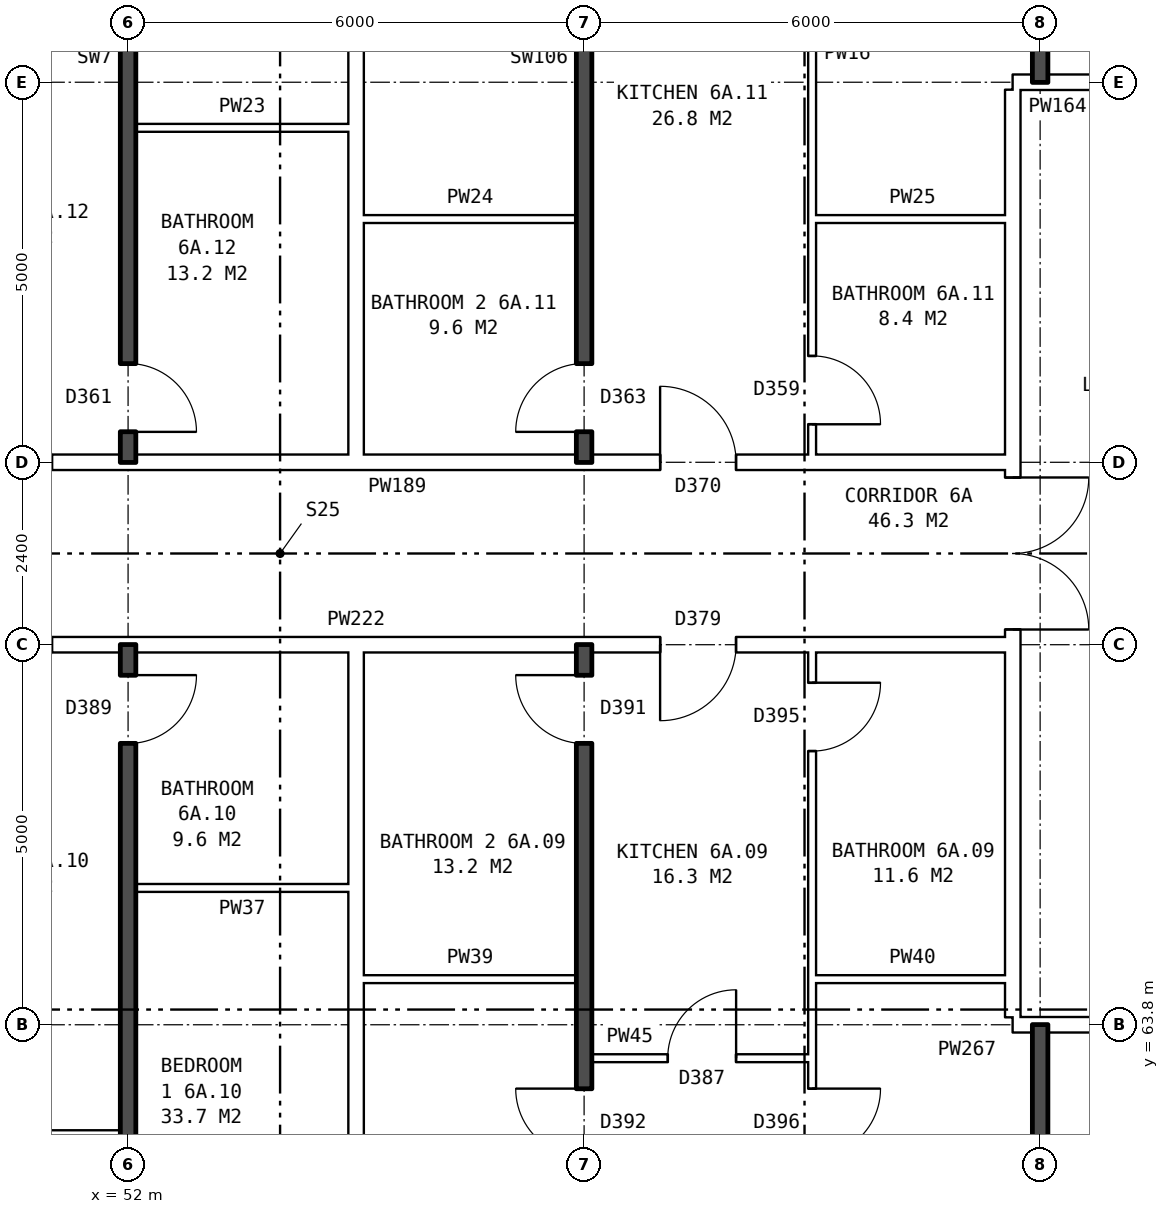
"""IFC4 building model, lengths in metres.
Left out: names, types, materials, properties, quantities, classifications, styles, units other than length and angle.
Written with IfcOpenShell. Run it as: python <this file> out.ifc"""

import sys

from ifc_helpers import new_model, si_unit, direction, frame, frame_2d, origin, place, context, subcontext, project, spatial, rectangle, extrude, element, fill, save


model = new_model("IFC4")
c1 = context("Model", 3, precision=1e-05, world=origin(), true_north=direction((0.0, 1.0)))
c2 = subcontext(c1, "Body", "Model", "MODEL_VIEW")
j1 = project(units=[si_unit("LENGTHUNIT", "METRE"), si_unit("PLANEANGLEUNIT", "RADIAN")], contexts=[c1])
p1 = place(None, origin())
s1 = spatial("IfcSite", under=j1, at=p1, CompositionType="ELEMENT")
p2 = place(p1, origin())
s2 = spatial("IfcBuilding", under=s1, at=p2, CompositionType="ELEMENT")
p3 = place(p2, frame((0.0, 0.0, 25.7)))
s3 = spatial("IfcBuildingStorey", under=s2, at=p3, CompositionType="ELEMENT", Elevation=25.7)
p4 = place(p3, frame((63.64, 63.9, 0.0), z_axis=(0.0, 0.0, 1.0), x_axis=(0.0, 1.0, 0.0)))
e1 = element("IfcWall", 1, at=p4, inside=s3, PredefinedType="PARTITIONING", context=c2, shape_type="SweptSolid", body=[
    extrude(rectangle(XDim=12.2, YDim=0.2, at=frame_2d((6.1, 0.0))), origin(), (0.0, 0.0, 1.0), 2.85),
])
p5 = place(p4, frame((5.1, 0.0, 0.0)))
e2 = element("IfcOpeningElement", 2, at=p5, cuts=e1, PredefinedType="OPENING", context=c2, shape_type="SweptSolid", body=[
    extrude(rectangle(XDim=2.0, YDim=2.1, at=frame_2d((1.0, 1.05))), frame((0.0, 0.11, 0.0), z_axis=(0.0, -1.0, 0.0), x_axis=(1.0, 0.0, 0.0)), (0.0, 0.0, 1.0), 0.22),
])
p6 = place(p3, frame((49.0, 62.36, 0.0), z_axis=(0.0, 0.0, 1.0), x_axis=(1.0, 0.0, 0.0)))
e3 = element("IfcWall", 3, at=p6, inside=s3, PredefinedType="PARTITIONING", context=c2, shape_type="SweptSolid", body=[
    extrude(rectangle(XDim=2.9, YDim=0.1, at=frame_2d((1.45, 0.0))), origin(), (0.0, 0.0, 1.0), 2.85),
])
p7 = place(p6, frame((1.0, 0.0, 0.0)))
e4 = element("IfcOpeningElement", 4, at=p7, cuts=e3, PredefinedType="OPENING", context=c2, shape_type="SweptSolid", body=[
    extrude(rectangle(XDim=0.9, YDim=2.1, at=frame_2d((0.45, 1.05))), frame((0.0, 0.06, 0.0), z_axis=(0.0, -1.0, 0.0), x_axis=(1.0, 0.0, 0.0)), (0.0, 0.0, 1.0), 0.12),
])
p8 = place(p3, frame((58.1, 63.36, 0.0), z_axis=(0.0, 0.0, 1.0), x_axis=(1.0, 0.0, 0.0)))
e5 = element("IfcWall", 5, at=p8, inside=s3, PredefinedType="PARTITIONING", context=c2, shape_type="SweptSolid", body=[
    extrude(rectangle(XDim=2.9, YDim=0.1, at=frame_2d((1.45, 0.0))), origin(), (0.0, 0.0, 1.0), 2.85),
])
p9 = place(p8, frame((1.0, 0.0, 0.0)))
e6 = element("IfcOpeningElement", 6, at=p9, cuts=e5, PredefinedType="OPENING", context=c2, shape_type="SweptSolid", body=[
    extrude(rectangle(XDim=0.9, YDim=2.1, at=frame_2d((0.45, 1.05))), frame((0.0, 0.06, 0.0), z_axis=(0.0, -1.0, 0.0), x_axis=(1.0, 0.0, 0.0)), (0.0, 0.0, 1.0), 0.12),
])
p10 = place(p3, frame((63.64, 63.8, 0.0), z_axis=(0.0, 0.0, 1.0), x_axis=(1.0, 0.0, 0.0)))
e7 = element("IfcWall", 7, at=p10, inside=s3, PredefinedType="PARTITIONING", context=c2, shape_type="SweptSolid", body=[
    extrude(rectangle(XDim=3.0, YDim=0.2, at=frame_2d((1.5, 0.0))), origin(), (0.0, 0.0, 1.0), 2.85),
])
p11 = place(p10, frame((1.18, 0.0, 0.0)))
e8 = element("IfcOpeningElement", 8, at=p11, cuts=e7, PredefinedType="OPENING", context=c2, shape_type="SweptSolid", body=[
    extrude(rectangle(XDim=1.0, YDim=2.1, at=frame_2d((0.5, 1.05))), frame((0.0, 0.11, 0.0), z_axis=(0.0, -1.0, 0.0), x_axis=(1.0, 0.0, 0.0)), (0.0, 0.0, 1.0), 0.22),
])
p12 = place(p3, frame((55.1, 64.4, 0.0), z_axis=(0.0, 0.0, 1.0), x_axis=(1.0, 0.0, 0.0)))
e9 = element("IfcWall", 9, at=p12, inside=s3, PredefinedType="PARTITIONING", context=c2, shape_type="SweptSolid", body=[
    extrude(rectangle(XDim=2.8, YDim=0.1, at=frame_2d((1.4, 0.0))), origin(), (0.0, 0.0, 1.0), 2.85),
])
p13 = place(p3, frame((61.0, 64.4, 0.0), z_axis=(0.0, 0.0, 1.0), x_axis=(1.0, 0.0, 0.0)))
e10 = element("IfcWall", 10, at=p13, inside=s3, PredefinedType="PARTITIONING", context=c2, shape_type="SweptSolid", body=[
    extrude(rectangle(XDim=2.64, YDim=0.1, at=frame_2d((1.32, 0.0))), origin(), (0.0, 0.0, 1.0), 2.85),
])
p14 = place(p3, frame((52.1, 65.6, 0.0), z_axis=(0.0, 0.0, 1.0), x_axis=(1.0, 0.0, 0.0)))
e11 = element("IfcWall", 11, at=p14, inside=s3, PredefinedType="PARTITIONING", context=c2, shape_type="SweptSolid", body=[
    extrude(rectangle(XDim=2.8, YDim=0.1, at=frame_2d((1.4, 0.0))), origin(), (0.0, 0.0, 1.0), 2.85),
])
p15 = place(p3, frame((44.36, 68.8, 0.0), z_axis=(0.0, 0.0, 1.0), x_axis=(1.0, 0.0, 0.0)))
e12 = element("IfcWall", 12, at=p15, inside=s3, PredefinedType="PARTITIONING", context=c2, shape_type="SweptSolid", body=[
    extrude(rectangle(XDim=19.28, YDim=0.2, at=frame_2d((9.64, 0.0))), origin(), (0.0, 0.0, 1.0), 2.85),
])
p16 = place(p15, frame((14.64, 0.0, 0.0)))
e13 = element("IfcOpeningElement", 13, at=p16, cuts=e12, PredefinedType="OPENING", context=c2, shape_type="SweptSolid", body=[
    extrude(rectangle(XDim=1.0, YDim=2.1, at=frame_2d((0.5, 1.05))), frame((0.0, 0.11, 0.0), z_axis=(0.0, -1.0, 0.0), x_axis=(1.0, 0.0, 0.0)), (0.0, 0.0, 1.0), 0.22),
])
p17 = place(p15, frame((5.64, 0.0, 0.0)))
e14 = element("IfcOpeningElement", 14, at=p17, cuts=e12, PredefinedType="OPENING", context=c2, shape_type="SweptSolid", body=[
    extrude(rectangle(XDim=1.0, YDim=2.1, at=frame_2d((0.5, 1.05))), frame((0.0, 0.11, 0.0), z_axis=(0.0, -1.0, 0.0), x_axis=(1.0, 0.0, 0.0)), (0.0, 0.0, 1.0), 0.22),
])
p18 = place(p3, frame((44.36, 71.2, 0.0), z_axis=(0.0, 0.0, 1.0), x_axis=(1.0, 0.0, 0.0)))
e15 = element("IfcWall", 15, at=p18, inside=s3, PredefinedType="PARTITIONING", context=c2, shape_type="SweptSolid", body=[
    extrude(rectangle(XDim=19.28, YDim=0.2, at=frame_2d((9.64, 0.0))), origin(), (0.0, 0.0, 1.0), 2.85),
])
p19 = place(p18, frame((14.64, 0.0, 0.0)))
e16 = element("IfcOpeningElement", 16, at=p19, cuts=e15, PredefinedType="OPENING", context=c2, shape_type="SweptSolid", body=[
    extrude(rectangle(XDim=1.0, YDim=2.1, at=frame_2d((0.5, 1.05))), frame((0.0, 0.11, 0.0), z_axis=(0.0, -1.0, 0.0), x_axis=(1.0, 0.0, 0.0)), (0.0, 0.0, 1.0), 0.22),
])
p20 = place(p18, frame((5.64, 0.0, 0.0)))
e17 = element("IfcOpeningElement", 17, at=p20, cuts=e15, PredefinedType="OPENING", context=c2, shape_type="SweptSolid", body=[
    extrude(rectangle(XDim=1.0, YDim=2.1, at=frame_2d((0.5, 1.05))), frame((0.0, 0.11, 0.0), z_axis=(0.0, -1.0, 0.0), x_axis=(1.0, 0.0, 0.0)), (0.0, 0.0, 1.0), 0.22),
])
p21 = place(p3, frame((55.1, 74.4, 0.0), z_axis=(0.0, 0.0, 1.0), x_axis=(1.0, 0.0, 0.0)))
e18 = element("IfcWall", 18, at=p21, inside=s3, PredefinedType="PARTITIONING", context=c2, shape_type="SweptSolid", body=[
    extrude(rectangle(XDim=2.8, YDim=0.1, at=frame_2d((1.4, 0.0))), origin(), (0.0, 0.0, 1.0), 2.85),
])
p22 = place(p3, frame((61.0, 74.4, 0.0), z_axis=(0.0, 0.0, 1.0), x_axis=(1.0, 0.0, 0.0)))
e19 = element("IfcWall", 19, at=p22, inside=s3, PredefinedType="PARTITIONING", context=c2, shape_type="SweptSolid", body=[
    extrude(rectangle(XDim=2.64, YDim=0.1, at=frame_2d((1.32, 0.0))), origin(), (0.0, 0.0, 1.0), 2.85),
])
p23 = place(p3, frame((52.1, 75.6, 0.0), z_axis=(0.0, 0.0, 1.0), x_axis=(1.0, 0.0, 0.0)))
e20 = element("IfcWall", 20, at=p23, inside=s3, PredefinedType="PARTITIONING", context=c2, shape_type="SweptSolid", body=[
    extrude(rectangle(XDim=2.8, YDim=0.1, at=frame_2d((1.4, 0.0))), origin(), (0.0, 0.0, 1.0), 2.85),
])
p24 = place(p3, frame((63.64, 76.2, 0.0), z_axis=(0.0, 0.0, 1.0), x_axis=(1.0, 0.0, 0.0)))
e21 = element("IfcWall", 21, at=p24, inside=s3, PredefinedType="PARTITIONING", context=c2, shape_type="SweptSolid", body=[
    extrude(rectangle(XDim=3.0, YDim=0.2, at=frame_2d((1.5, 0.0))), origin(), (0.0, 0.0, 1.0), 2.85),
])
p25 = place(p24, frame((1.18, 0.0, 0.0)))
e22 = element("IfcOpeningElement", 22, at=p25, cuts=e21, PredefinedType="OPENING", context=c2, shape_type="SweptSolid", body=[
    extrude(rectangle(XDim=1.0, YDim=2.1, at=frame_2d((0.5, 1.05))), frame((0.0, 0.11, 0.0), z_axis=(0.0, -1.0, 0.0), x_axis=(1.0, 0.0, 0.0)), (0.0, 0.0, 1.0), 0.22),
])
p26 = place(p3, frame((52.0, 54.36, 0.0), z_axis=(0.0, 0.0, 1.0), x_axis=(0.0, 1.0, 0.0)))
e23 = element("IfcWall", 23, at=p26, inside=s3, PredefinedType="SOLIDWALL", context=c2, shape_type="SweptSolid", body=[
    extrude(rectangle(XDim=14.44, YDim=0.2, at=frame_2d((7.22, 0.0))), origin(), (0.0, 0.0, 1.0), 2.85),
])
p27 = place(p26, frame((6.7, 0.0, 0.0)))
e24 = element("IfcOpeningElement", 24, at=p27, cuts=e23, PredefinedType="OPENING", context=c2, shape_type="SweptSolid", body=[
    extrude(rectangle(XDim=0.9, YDim=2.1, at=frame_2d((0.45, 1.05))), frame((0.0, 0.11, 0.0), z_axis=(0.0, -1.0, 0.0), x_axis=(1.0, 0.0, 0.0)), (0.0, 0.0, 1.0), 0.22),
])
p28 = place(p26, frame((13.14, 0.0, 0.0)))
e25 = element("IfcOpeningElement", 25, at=p28, cuts=e23, PredefinedType="OPENING", context=c2, shape_type="SweptSolid", body=[
    extrude(rectangle(XDim=0.9, YDim=2.1, at=frame_2d((0.45, 1.05))), frame((0.0, 0.11, 0.0), z_axis=(0.0, -1.0, 0.0), x_axis=(1.0, 0.0, 0.0)), (0.0, 0.0, 1.0), 0.22),
])
p29 = place(p3, frame((52.0, 71.2, 0.0), z_axis=(0.0, 0.0, 1.0), x_axis=(0.0, 1.0, 0.0)))
e26 = element("IfcWall", 26, at=p29, inside=s3, PredefinedType="SOLIDWALL", context=c2, shape_type="SweptSolid", body=[
    extrude(rectangle(XDim=14.44, YDim=0.2, at=frame_2d((7.22, 0.0))), origin(), (0.0, 0.0, 1.0), 2.85),
])
p30 = place(p29, frame((9.34, 0.0, 0.0)))
e27 = element("IfcOpeningElement", 27, at=p30, cuts=e26, PredefinedType="OPENING", context=c2, shape_type="SweptSolid", body=[
    extrude(rectangle(XDim=0.9, YDim=2.1, at=frame_2d((0.45, 1.05))), frame((0.0, 0.11, 0.0), z_axis=(0.0, -1.0, 0.0), x_axis=(1.0, 0.0, 0.0)), (0.0, 0.0, 1.0), 0.22),
])
p31 = place(p29, frame((0.4, 0.0, 0.0)))
e28 = element("IfcOpeningElement", 28, at=p31, cuts=e26, PredefinedType="OPENING", context=c2, shape_type="SweptSolid", body=[
    extrude(rectangle(XDim=0.9, YDim=2.1, at=frame_2d((0.45, 1.05))), frame((0.0, 0.11, 0.0), z_axis=(0.0, -1.0, 0.0), x_axis=(1.0, 0.0, 0.0)), (0.0, 0.0, 1.0), 0.22),
])
for number, where, z_axis, x_axis in (
    (29, (55.0, 54.36, 0.0), (0.0, 0.0, 1.0), (0.0, 1.0, 0.0)),
    (30, (55.0, 71.3, 0.0), (0.0, 0.0, 1.0), (0.0, 1.0, 0.0)),
):
    element("IfcWall", number, at=place(p3, frame(where, z_axis=z_axis, x_axis=x_axis)), inside=s3, PredefinedType="PARTITIONING", context=c2, shape_type="SweptSolid", body=[
        extrude(rectangle(XDim=14.34, YDim=0.2, at=frame_2d((7.17, 0.0))), origin(), (0.0, 0.0, 1.0), 2.85),
    ])
p32 = place(p3, frame((58.0, 54.36, 0.0), z_axis=(0.0, 0.0, 1.0), x_axis=(0.0, 1.0, 0.0)))
e31 = element("IfcWall", 31, at=p32, inside=s3, PredefinedType="SOLIDWALL", context=c2, shape_type="SweptSolid", body=[
    extrude(rectangle(XDim=14.44, YDim=0.2, at=frame_2d((7.22, 0.0))), origin(), (0.0, 0.0, 1.0), 2.85),
])
p33 = place(p32, frame((7.7, 0.0, 0.0)))
e32 = element("IfcOpeningElement", 32, at=p33, cuts=e31, PredefinedType="OPENING", context=c2, shape_type="SweptSolid", body=[
    extrude(rectangle(XDim=0.9, YDim=2.1, at=frame_2d((0.45, 1.05))), frame((0.0, 0.11, 0.0), z_axis=(0.0, -1.0, 0.0), x_axis=(1.0, 0.0, 0.0)), (0.0, 0.0, 1.0), 0.22),
])
p34 = place(p32, frame((13.14, 0.0, 0.0)))
e33 = element("IfcOpeningElement", 33, at=p34, cuts=e31, PredefinedType="OPENING", context=c2, shape_type="SweptSolid", body=[
    extrude(rectangle(XDim=0.9, YDim=2.1, at=frame_2d((0.45, 1.05))), frame((0.0, 0.11, 0.0), z_axis=(0.0, -1.0, 0.0), x_axis=(1.0, 0.0, 0.0)), (0.0, 0.0, 1.0), 0.22),
])
p35 = place(p3, frame((58.0, 71.2, 0.0), z_axis=(0.0, 0.0, 1.0), x_axis=(0.0, 1.0, 0.0)))
e34 = element("IfcWall", 34, at=p35, inside=s3, PredefinedType="SOLIDWALL", context=c2, shape_type="SweptSolid", body=[
    extrude(rectangle(XDim=14.44, YDim=0.2, at=frame_2d((7.22, 0.0))), origin(), (0.0, 0.0, 1.0), 2.85),
])
p36 = place(p35, frame((9.34, 0.0, 0.0)))
e35 = element("IfcOpeningElement", 35, at=p36, cuts=e34, PredefinedType="OPENING", context=c2, shape_type="SweptSolid", body=[
    extrude(rectangle(XDim=0.9, YDim=2.1, at=frame_2d((0.45, 1.05))), frame((0.0, 0.11, 0.0), z_axis=(0.0, -1.0, 0.0), x_axis=(1.0, 0.0, 0.0)), (0.0, 0.0, 1.0), 0.22),
])
p37 = place(p35, frame((0.4, 0.0, 0.0)))
e36 = element("IfcOpeningElement", 36, at=p37, cuts=e34, PredefinedType="OPENING", context=c2, shape_type="SweptSolid", body=[
    extrude(rectangle(XDim=0.9, YDim=2.1, at=frame_2d((0.45, 1.05))), frame((0.0, 0.11, 0.0), z_axis=(0.0, -1.0, 0.0), x_axis=(1.0, 0.0, 0.0)), (0.0, 0.0, 1.0), 0.22),
])
p38 = place(p3, frame((61.0, 54.36, 0.0), z_axis=(0.0, 0.0, 1.0), x_axis=(0.0, 1.0, 0.0)))
e37 = element("IfcWall", 37, at=p38, inside=s3, PredefinedType="PARTITIONING", context=c2, shape_type="SweptSolid", body=[
    extrude(rectangle(XDim=14.34, YDim=0.1, at=frame_2d((7.17, 0.0))), origin(), (0.0, 0.0, 1.0), 2.85),
])
p39 = place(p38, frame((7.7, 0.0, 0.0)))
e38 = element("IfcOpeningElement", 38, at=p39, cuts=e37, PredefinedType="OPENING", context=c2, shape_type="SweptSolid", body=[
    extrude(rectangle(XDim=0.9, YDim=2.1, at=frame_2d((0.45, 1.05))), frame((0.0, 0.06, 0.0), z_axis=(0.0, -1.0, 0.0), x_axis=(1.0, 0.0, 0.0)), (0.0, 0.0, 1.0), 0.12),
])
p40 = place(p38, frame((13.04, 0.0, 0.0)))
e39 = element("IfcOpeningElement", 39, at=p40, cuts=e37, PredefinedType="OPENING", context=c2, shape_type="SweptSolid", body=[
    extrude(rectangle(XDim=0.9, YDim=2.1, at=frame_2d((0.45, 1.05))), frame((0.0, 0.06, 0.0), z_axis=(0.0, -1.0, 0.0), x_axis=(1.0, 0.0, 0.0)), (0.0, 0.0, 1.0), 0.12),
])
p41 = place(p3, frame((61.0, 71.3, 0.0), z_axis=(0.0, 0.0, 1.0), x_axis=(0.0, 1.0, 0.0)))
e40 = element("IfcWall", 40, at=p41, inside=s3, PredefinedType="PARTITIONING", context=c2, shape_type="SweptSolid", body=[
    extrude(rectangle(XDim=14.34, YDim=0.1, at=frame_2d((7.17, 0.0))), origin(), (0.0, 0.0, 1.0), 2.85),
])
p42 = place(p41, frame((9.24, 0.0, 0.0)))
e41 = element("IfcOpeningElement", 41, at=p42, cuts=e40, PredefinedType="OPENING", context=c2, shape_type="SweptSolid", body=[
    extrude(rectangle(XDim=0.9, YDim=2.1, at=frame_2d((0.45, 1.05))), frame((0.0, 0.06, 0.0), z_axis=(0.0, -1.0, 0.0), x_axis=(1.0, 0.0, 0.0)), (0.0, 0.0, 1.0), 0.12),
])
p43 = place(p41, frame((0.4, 0.0, 0.0)))
e42 = element("IfcOpeningElement", 42, at=p43, cuts=e40, PredefinedType="OPENING", context=c2, shape_type="SweptSolid", body=[
    extrude(rectangle(XDim=0.9, YDim=2.1, at=frame_2d((0.45, 1.05))), frame((0.0, 0.06, 0.0), z_axis=(0.0, -1.0, 0.0), x_axis=(1.0, 0.0, 0.0)), (0.0, 0.0, 1.0), 0.12),
])
for number, where, z_axis, x_axis in (
    (43, (64.0, 54.36, 0.0), (0.0, 0.0, 1.0), (0.0, 1.0, 0.0)),
    (44, (64.0, 76.2, 0.0), (0.0, 0.0, 1.0), (0.0, 1.0, 0.0)),
):
    element("IfcWall", number, at=place(p3, frame(where, z_axis=z_axis, x_axis=x_axis)), inside=s3, PredefinedType="SOLIDWALL", context=c2, shape_type="SweptSolid", body=[
        extrude(rectangle(XDim=9.44, YDim=0.2, at=frame_2d((4.72, 0.0))), origin(), (0.0, 0.0, 1.0), 2.85),
    ])
p44 = place(p5, frame((2.0, 0.0, 0.0), z_axis=(0.0, 0.0, 1.0), x_axis=(-1.0, 0.0, 0.0)))
e45 = element("IfcDoor", 45, at=p44, inside=s3, OperationType="DOUBLE_DOOR_SINGLE_SWING", PredefinedType="DOOR", context=c2, shape_type="SweptSolid", body=[
    extrude(rectangle(XDim=2.0, YDim=2.1, at=frame_2d((1.0, 1.05))), frame((0.0, 0.025, 0.0), z_axis=(0.0, -1.0, 0.0), x_axis=(1.0, 0.0, 0.0)), (0.0, 0.0, 1.0), 0.05),
])
fill(e2, e45)
p45 = place(p39, frame((0.9, 0.0, 0.0), z_axis=(0.0, 0.0, 1.0), x_axis=(-1.0, 0.0, 0.0)))
e46 = element("IfcDoor", 46, at=p45, inside=s3, OperationType="SINGLE_SWING_LEFT", PredefinedType="DOOR", context=c2, shape_type="SweptSolid", body=[
    extrude(rectangle(XDim=0.9, YDim=2.1, at=frame_2d((0.45, 1.05))), frame((0.0, 0.025, 0.0), z_axis=(0.0, -1.0, 0.0), x_axis=(1.0, 0.0, 0.0)), (0.0, 0.0, 1.0), 0.05),
])
fill(e38, e46)
p46 = place(p33, origin())
e47 = element("IfcDoor", 47, at=p46, inside=s3, OperationType="SINGLE_SWING_RIGHT", PredefinedType="DOOR", context=c2, shape_type="SweptSolid", body=[
    extrude(rectangle(XDim=0.9, YDim=2.1, at=frame_2d((0.45, 1.05))), frame((0.0, 0.025, 0.0), z_axis=(0.0, -1.0, 0.0), x_axis=(1.0, 0.0, 0.0)), (0.0, 0.0, 1.0), 0.05),
])
fill(e32, e47)
p47 = place(p16, frame((1.0, 0.0, 0.0), z_axis=(0.0, 0.0, 1.0), x_axis=(-1.0, 0.0, 0.0)))
e48 = element("IfcDoor", 48, at=p47, inside=s3, OperationType="SINGLE_SWING_RIGHT", PredefinedType="DOOR", context=c2, shape_type="SweptSolid", body=[
    extrude(rectangle(XDim=1.0, YDim=2.1, at=frame_2d((0.5, 1.05))), frame((0.0, 0.025, 0.0), z_axis=(0.0, -1.0, 0.0), x_axis=(1.0, 0.0, 0.0)), (0.0, 0.0, 1.0), 0.05),
])
fill(e13, e48)
p48 = place(p9, origin())
e49 = element("IfcDoor", 49, at=p48, inside=s3, OperationType="SINGLE_SWING_RIGHT", PredefinedType="DOOR", context=c2, shape_type="SweptSolid", body=[
    extrude(rectangle(XDim=0.9, YDim=2.1, at=frame_2d((0.45, 1.05))), frame((0.0, 0.025, 0.0), z_axis=(0.0, -1.0, 0.0), x_axis=(1.0, 0.0, 0.0)), (0.0, 0.0, 1.0), 0.05),
])
fill(e6, e49)
p49 = place(p40, frame((0.9, 0.0, 0.0), z_axis=(0.0, 0.0, 1.0), x_axis=(-1.0, 0.0, 0.0)))
e50 = element("IfcDoor", 50, at=p49, inside=s3, OperationType="SINGLE_SWING_LEFT", PredefinedType="DOOR", context=c2, shape_type="SweptSolid", body=[
    extrude(rectangle(XDim=0.9, YDim=2.1, at=frame_2d((0.45, 1.05))), frame((0.0, 0.025, 0.0), z_axis=(0.0, -1.0, 0.0), x_axis=(1.0, 0.0, 0.0)), (0.0, 0.0, 1.0), 0.05),
])
fill(e39, e50)
p50 = place(p34, origin())
e51 = element("IfcDoor", 51, at=p50, inside=s3, OperationType="SINGLE_SWING_RIGHT", PredefinedType="DOOR", context=c2, shape_type="SweptSolid", body=[
    extrude(rectangle(XDim=0.9, YDim=2.1, at=frame_2d((0.45, 1.05))), frame((0.0, 0.025, 0.0), z_axis=(0.0, -1.0, 0.0), x_axis=(1.0, 0.0, 0.0)), (0.0, 0.0, 1.0), 0.05),
])
fill(e33, e51)
p51 = place(p28, frame((0.9, 0.0, 0.0), z_axis=(0.0, 0.0, 1.0), x_axis=(-1.0, 0.0, 0.0)))
e52 = element("IfcDoor", 52, at=p51, inside=s3, OperationType="SINGLE_SWING_LEFT", PredefinedType="DOOR", context=c2, shape_type="SweptSolid", body=[
    extrude(rectangle(XDim=0.9, YDim=2.1, at=frame_2d((0.45, 1.05))), frame((0.0, 0.025, 0.0), z_axis=(0.0, -1.0, 0.0), x_axis=(1.0, 0.0, 0.0)), (0.0, 0.0, 1.0), 0.05),
])
fill(e25, e52)
p52 = place(p19, origin())
e53 = element("IfcDoor", 53, at=p52, inside=s3, OperationType="SINGLE_SWING_LEFT", PredefinedType="DOOR", context=c2, shape_type="SweptSolid", body=[
    extrude(rectangle(XDim=1.0, YDim=2.1, at=frame_2d((0.5, 1.05))), frame((0.0, 0.025, 0.0), z_axis=(0.0, -1.0, 0.0), x_axis=(1.0, 0.0, 0.0)), (0.0, 0.0, 1.0), 0.05),
])
fill(e16, e53)
p53 = place(p43, frame((0.9, 0.0, 0.0), z_axis=(0.0, 0.0, 1.0), x_axis=(-1.0, 0.0, 0.0)))
e54 = element("IfcDoor", 54, at=p53, inside=s3, OperationType="SINGLE_SWING_RIGHT", PredefinedType="DOOR", context=c2, shape_type="SweptSolid", body=[
    extrude(rectangle(XDim=0.9, YDim=2.1, at=frame_2d((0.45, 1.05))), frame((0.0, 0.025, 0.0), z_axis=(0.0, -1.0, 0.0), x_axis=(1.0, 0.0, 0.0)), (0.0, 0.0, 1.0), 0.05),
])
fill(e42, e54)
p54 = place(p37, origin())
e55 = element("IfcDoor", 55, at=p54, inside=s3, OperationType="SINGLE_SWING_LEFT", PredefinedType="DOOR", context=c2, shape_type="SweptSolid", body=[
    extrude(rectangle(XDim=0.9, YDim=2.1, at=frame_2d((0.45, 1.05))), frame((0.0, 0.025, 0.0), z_axis=(0.0, -1.0, 0.0), x_axis=(1.0, 0.0, 0.0)), (0.0, 0.0, 1.0), 0.05),
])
fill(e36, e55)
p55 = place(p31, frame((0.9, 0.0, 0.0), z_axis=(0.0, 0.0, 1.0), x_axis=(-1.0, 0.0, 0.0)))
e56 = element("IfcDoor", 56, at=p55, inside=s3, OperationType="SINGLE_SWING_RIGHT", PredefinedType="DOOR", context=c2, shape_type="SweptSolid", body=[
    extrude(rectangle(XDim=0.9, YDim=2.1, at=frame_2d((0.45, 1.05))), frame((0.0, 0.025, 0.0), z_axis=(0.0, -1.0, 0.0), x_axis=(1.0, 0.0, 0.0)), (0.0, 0.0, 1.0), 0.05),
])
fill(e28, e56)
save(model, sys.argv[1])
